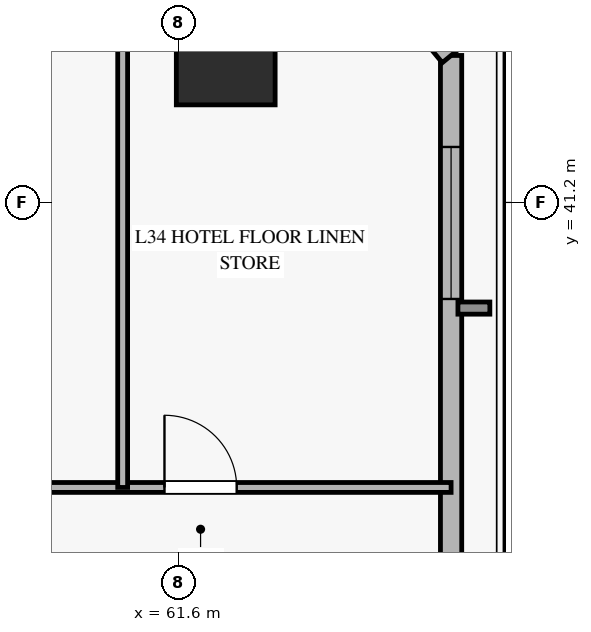
"""IFC4 building model, lengths in metres.
Left out: names, types, materials, properties, quantities, classifications, styles, units other than length and angle.
Written with IfcOpenShell. Run it as: python <this file> out.ifc"""

import sys

from ifc_helpers import new_model, si_unit, direction, frame, frame_2d, origin, origin_2d, place, context, subcontext, project, spatial, rectangle, hollow_rectangle, extrude, source, transform, mapped, element, fill, save


model = new_model("IFC4")
c1 = context("Model", 3, precision=1e-05, world=origin(), true_north=direction((0.0, 1.0)))
c2 = subcontext(c1, "Body", "Model", "MODEL_VIEW")
j1 = project(units=[si_unit("LENGTHUNIT", "METRE"), si_unit("PLANEANGLEUNIT", "RADIAN")], contexts=[c1])
p1 = place(None, origin())
s1 = spatial("IfcSite", under=j1, at=p1, CompositionType="ELEMENT")
p2 = place(p1, origin())
s2 = spatial("IfcBuilding", under=s1, at=p2, CompositionType="ELEMENT")
p3 = place(p2, frame((0.0, 0.0, 141.2)))
s3 = spatial("IfcBuildingStorey", under=s2, at=p3, CompositionType="ELEMENT", Elevation=141.2)
m1 = source(origin(), c2, "Body", "SweptSolid", [
    extrude(hollow_rectangle(XDim=1.3, YDim=1.3, WallThickness=0.06, at=origin_2d()), origin(), (0.0, 0.0, 1.0), 3.22),
])
p4 = place(p3, frame((62.221, 43.134, 0.0), z_axis=(0.0, 0.0, 1.0), x_axis=(1.0, 0.0, 0.0)))
e1 = element("IfcColumn", 1, at=p4, inside=s3, PredefinedType="COLUMN", context=c2, shape_type="MappedRepresentation", body=[
    mapped(m1, transform((0.0, 0.0, 0.0), x_axis=(1.0, 0.0, 0.0), y_axis=(0.0, 1.0, 0.0), z_axis=(0.0, 0.0, 1.0), scale=1.0)),
])
p5 = place(p3, frame((65.186, 27.472, 0.0), z_axis=(0.0, 0.0, 1.0), x_axis=(0.0, 1.0, 0.0)))
e2 = element("IfcWall", 2, at=p5, inside=s3, PredefinedType="SOLIDWALL", context=c2, shape_type="SweptSolid", body=[
    extrude(rectangle(XDim=15.662, YDim=0.28, at=frame_2d((7.831, 0.0))), origin(), (0.0, 0.0, 1.0), 2.7),
])
p6 = place(p5, frame((1.823, 0.0, 0.45)))
e3 = element("IfcOpeningElement", 3, at=p6, cuts=e2, PredefinedType="OPENING", context=c2, shape_type="SweptSolid", body=[
    extrude(rectangle(XDim=2.0, YDim=2.0, at=frame_2d((1.0, 1.0))), frame((0.0, 0.15, 0.0), z_axis=(0.0, -1.0, 0.0), x_axis=(1.0, 0.0, 0.0)), (0.0, 0.0, 1.0), 0.3),
])
p7 = place(p5, frame((12.458, 0.0, 0.45)))
e4 = element("IfcOpeningElement", 4, at=p7, cuts=e2, PredefinedType="OPENING", context=c2, shape_type="SweptSolid", body=[
    extrude(rectangle(XDim=2.0, YDim=2.0, at=frame_2d((1.0, 1.0))), frame((0.0, 0.15, 0.0), z_axis=(0.0, -1.0, 0.0), x_axis=(1.0, 0.0, 0.0)), (0.0, 0.0, 1.0), 0.3),
])
p8 = place(p3, frame((65.186, 43.134, 0.0), z_axis=(0.0, 0.0, 1.0), x_axis=(-0.63553760815, 0.772069911748, 0.0)))
e5 = element("IfcWall", 5, at=p8, inside=s3, PredefinedType="SOLIDWALL", context=c2, shape_type="SweptSolid", body=[
    extrude(rectangle(XDim=4.036, YDim=0.3, at=frame_2d((2.018, 0.0))), origin(), (0.0, 0.0, 1.0), 2.7),
])
p9 = place(p8, frame((1.218, 0.0, 0.45)))
e6 = element("IfcOpeningElement", 6, at=p9, cuts=e5, PredefinedType="OPENING", context=c2, shape_type="SweptSolid", body=[
    extrude(rectangle(XDim=1.6, YDim=2.0, at=frame_2d((0.8, 1.0))), frame((0.0, 0.16, 0.0), z_axis=(0.0, -1.0, 0.0), x_axis=(1.0, 0.0, 0.0)), (0.0, 0.0, 1.0), 0.32),
])
p10 = place(p3, frame((51.15, 37.45, 0.0), z_axis=(0.0, 0.0, 1.0), x_axis=(1.0, 0.0, 0.0)))
e7 = element("IfcWall", 7, at=p10, inside=s3, PredefinedType="PARTITIONING", context=c2, shape_type="SweptSolid", body=[
    extrude(rectangle(XDim=14.036, YDim=0.13, at=frame_2d((7.018, 0.0))), origin(), (0.0, 0.0, 1.0), 2.705),
])
p11 = place(p10, frame((0.5, 0.0, 0.0)))
e8 = element("IfcOpeningElement", 8, at=p11, cuts=e7, PredefinedType="OPENING", context=c2, shape_type="SweptSolid", body=[
    extrude(rectangle(XDim=0.9, YDim=2.1, at=frame_2d((0.45, 1.05))), frame((0.0, 0.075, 0.0), z_axis=(0.0, -1.0, 0.0), x_axis=(1.0, 0.0, 0.0)), (0.0, 0.0, 1.0), 0.15),
])
p12 = place(p10, frame((10.265, 0.0, 0.0)))
e9 = element("IfcOpeningElement", 9, at=p12, cuts=e7, PredefinedType="OPENING", context=c2, shape_type="SweptSolid", body=[
    extrude(rectangle(XDim=0.95, YDim=2.1, at=frame_2d((0.475, 1.05))), frame((0.0, 0.075, 0.0), z_axis=(0.0, -1.0, 0.0), x_axis=(1.0, 0.0, 0.0)), (0.0, 0.0, 1.0), 0.15),
])
p13 = place(p3, frame((60.865, 37.45, 0.0), z_axis=(0.0, 0.0, 1.0), x_axis=(0.0, 1.0, 0.0)))
e10 = element("IfcWall", 10, at=p13, inside=s3, PredefinedType="PARTITIONING", context=c2, shape_type="SweptSolid", body=[
    extrude(rectangle(XDim=8.8, YDim=0.13, at=frame_2d((4.4, 0.0))), origin(), (0.0, 0.0, 1.0), 3.22),
])
m2 = source(origin(), c2, "Body", "SweptSolid", [
    extrude(rectangle(XDim=2.0, YDim=2.0, at=frame_2d((1.0, 1.0))), frame((0.0, 0.03, 0.0), z_axis=(0.0, -1.0, 0.0), x_axis=(1.0, 0.0, 0.0)), (0.0, 0.0, 1.0), 0.06),
])
p14 = place(p7, origin())
e11 = element("IfcWindow", 11, at=p14, inside=s3, PartitioningType="SINGLE_PANEL", PredefinedType="WINDOW", context=c2, shape_type="MappedRepresentation", body=[
    mapped(m2, transform((0.0, 0.0, 0.0), x_axis=(1.0, 0.0, 0.0), y_axis=(0.0, 1.0, 0.0), z_axis=(0.0, 0.0, 1.0), scale=1.0)),
])
fill(e4, e11)
m3 = source(origin(), c2, "Body", "SweptSolid", [
    extrude(rectangle(XDim=0.95, YDim=2.1, at=frame_2d((0.475, 1.05))), frame((0.0, 0.025, 0.0), z_axis=(0.0, -1.0, 0.0), x_axis=(1.0, 0.0, 0.0)), (0.0, 0.0, 1.0), 0.05),
])
p15 = place(p12, origin())
e12 = element("IfcDoor", 12, at=p15, inside=s3, OperationType="SINGLE_SWING_LEFT", PredefinedType="DOOR", context=c2, shape_type="MappedRepresentation", body=[
    mapped(m3, transform((0.0, 0.0, 0.0), x_axis=(1.0, 0.0, 0.0), y_axis=(0.0, 1.0, 0.0), z_axis=(0.0, 0.0, 1.0), scale=1.0)),
])
fill(e9, e12)
save(model, sys.argv[1])
